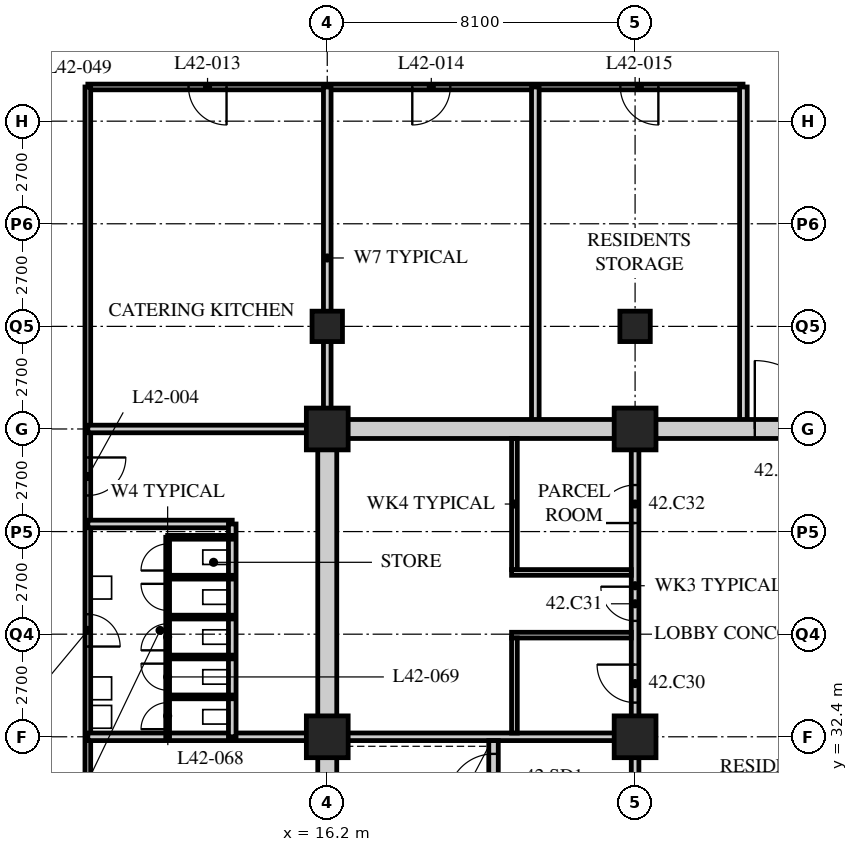
"""IFC4 building model, lengths in metres.
Left out: names, types, materials, properties, quantities, classifications, styles, units other than length and angle.
Written with IfcOpenShell. Run it as: python <this file> out.ifc"""

import sys

from ifc_helpers import new_model, si_unit, direction, frame, frame_2d, origin, origin_2d, place, context, subcontext, project, spatial, rectangle, hollow_rectangle, extrude, element, fill, save


model = new_model("IFC4")
c1 = context("Model", 3, precision=1e-05, world=origin(), true_north=direction((0.0, 1.0)))
c2 = subcontext(c1, "Body", "Model", "MODEL_VIEW")
j1 = project(units=[si_unit("LENGTHUNIT", "METRE"), si_unit("PLANEANGLEUNIT", "RADIAN")], contexts=[c1])
p1 = place(None, origin())
s1 = spatial("IfcSite", under=j1, at=p1, CompositionType="ELEMENT")
p2 = place(p1, origin())
s2 = spatial("IfcBuilding", under=s1, at=p2, CompositionType="ELEMENT")
p3 = place(p2, frame((0.0, 0.0, 165.0)))
s3 = spatial("IfcBuildingStorey", under=s2, at=p3, CompositionType="ELEMENT", Elevation=165.0)
for number, where, z_axis, x_axis in (
    (1, (16.2, 32.4, 0.0), (0.0, 0.0, 1.0), (1.0, 0.0, 0.0)),
    (2, (16.2, 40.5, 0.0), (0.0, 0.0, 1.0), (1.0, 0.0, 0.0)),
):
    element("IfcColumn", number, at=place(p3, frame(where, z_axis=z_axis, x_axis=x_axis)), inside=s3, PredefinedType="COLUMN", context=c2, shape_type="SweptSolid", body=[
        extrude(hollow_rectangle(XDim=1.1, YDim=1.1, WallThickness=0.1, at=origin_2d()), origin(), (0.0, 0.0, 1.0), 5.4),
    ])
p4 = place(p3, frame((16.2, 43.2, 0.0), z_axis=(0.0, 0.0, 1.0), x_axis=(1.0, 0.0, 0.0)))
e3 = element("IfcColumn", 3, at=p4, inside=s3, PredefinedType="COLUMN", context=c2, shape_type="SweptSolid", body=[
    extrude(hollow_rectangle(XDim=0.8, YDim=0.8, WallThickness=0.08, at=origin_2d()), origin(), (0.0, 0.0, 1.0), 5.4),
])
for number, where, z_axis, x_axis in (
    (4, (24.3, 32.4, 0.0), (0.0, 0.0, 1.0), (1.0, 0.0, 0.0)),
    (5, (24.3, 40.5, 0.0), (0.0, 0.0, 1.0), (1.0, 0.0, 0.0)),
):
    element("IfcColumn", number, at=place(p3, frame(where, z_axis=z_axis, x_axis=x_axis)), inside=s3, PredefinedType="COLUMN", context=c2, shape_type="SweptSolid", body=[
        extrude(hollow_rectangle(XDim=1.1, YDim=1.1, WallThickness=0.1, at=origin_2d()), origin(), (0.0, 0.0, 1.0), 5.4),
    ])
p5 = place(p3, frame((24.3, 43.2, 0.0), z_axis=(0.0, 0.0, 1.0), x_axis=(1.0, 0.0, 0.0)))
e6 = element("IfcColumn", 6, at=p5, inside=s3, PredefinedType="COLUMN", context=c2, shape_type="SweptSolid", body=[
    extrude(hollow_rectangle(XDim=0.8, YDim=0.8, WallThickness=0.08, at=origin_2d()), origin(), (0.0, 0.0, 1.0), 5.4),
])
p6 = place(p3, frame((27.14, 49.5, 0.0), z_axis=(0.0, 0.0, 1.0), x_axis=(-1.0, 0.0, 0.0)))
e7 = element("IfcWall", 7, at=p6, inside=s3, PredefinedType="PARTITIONING", context=c2, shape_type="SweptSolid", body=[
    extrude(rectangle(XDim=17.24, YDim=0.15, at=frame_2d((8.62, 0.0))), origin(), (0.0, 0.0, 1.0), 5.19),
])
p7 = place(p6, frame((13.59, 0.0, 0.0)))
e8 = element("IfcOpeningElement", 8, at=p7, cuts=e7, PredefinedType="OPENING", context=c2, shape_type="SweptSolid", body=[
    extrude(rectangle(XDim=1.0, YDim=2.1, at=frame_2d((0.5, 1.05))), frame((0.0, 0.085, 0.0), z_axis=(0.0, -1.0, 0.0), x_axis=(1.0, 0.0, 0.0)), (0.0, 0.0, 1.0), 0.17),
])
p8 = place(p6, frame((7.702, 0.0, 0.0)))
e9 = element("IfcOpeningElement", 9, at=p8, cuts=e7, PredefinedType="OPENING", context=c2, shape_type="SweptSolid", body=[
    extrude(rectangle(XDim=1.0, YDim=2.1, at=frame_2d((0.5, 1.05))), frame((0.0, 0.085, 0.0), z_axis=(0.0, -1.0, 0.0), x_axis=(1.0, 0.0, 0.0)), (0.0, 0.0, 1.0), 0.17),
])
p9 = place(p6, frame((2.228, 0.0, 0.0)))
e10 = element("IfcOpeningElement", 10, at=p9, cuts=e7, PredefinedType="OPENING", context=c2, shape_type="SweptSolid", body=[
    extrude(rectangle(XDim=1.0, YDim=2.1, at=frame_2d((0.5, 1.05))), frame((0.0, 0.085, 0.0), z_axis=(0.0, -1.0, 0.0), x_axis=(1.0, 0.0, 0.0)), (0.0, 0.0, 1.0), 0.17),
])
p10 = place(p3, frame((9.9, 49.5, 0.0), z_axis=(0.0, 0.0, 1.0), x_axis=(0.0, -1.0, 0.0)))
e11 = element("IfcWall", 11, at=p10, inside=s3, PredefinedType="PARTITIONING", context=c2, shape_type="SweptSolid", body=[
    extrude(rectangle(XDim=28.8, YDim=0.15, at=frame_2d((14.4, 0.0))), origin(), (0.0, 0.0, 1.0), 5.19),
])
p11 = place(p10, frame((22.375, 0.0, 0.0)))
e12 = element("IfcOpeningElement", 12, at=p11, cuts=e11, PredefinedType="OPENING", context=c2, shape_type="SweptSolid", body=[
    extrude(rectangle(XDim=0.85, YDim=2.1, at=frame_2d((0.425, 1.05))), frame((0.0, 0.085, 0.0), z_axis=(0.0, -1.0, 0.0), x_axis=(1.0, 0.0, 0.0)), (0.0, 0.0, 1.0), 0.17),
])
p12 = place(p10, frame((18.25, 0.0, 0.0)))
e13 = element("IfcOpeningElement", 13, at=p12, cuts=e11, PredefinedType="OPENING", context=c2, shape_type="SweptSolid", body=[
    extrude(rectangle(XDim=1.0, YDim=2.1, at=frame_2d((0.5, 1.05))), frame((0.0, 0.085, 0.0), z_axis=(0.0, -1.0, 0.0), x_axis=(1.0, 0.0, 0.0)), (0.0, 0.0, 1.0), 0.17),
])
p13 = place(p10, frame((13.875, 0.0, 0.0)))
e14 = element("IfcOpeningElement", 14, at=p13, cuts=e11, PredefinedType="OPENING", context=c2, shape_type="SweptSolid", body=[
    extrude(rectangle(XDim=0.85, YDim=2.1, at=frame_2d((0.425, 1.05))), frame((0.0, 0.085, 0.0), z_axis=(0.0, -1.0, 0.0), x_axis=(1.0, 0.0, 0.0)), (0.0, 0.0, 1.0), 0.17),
])
p14 = place(p10, frame((9.75, 0.0, 0.0)))
e15 = element("IfcOpeningElement", 15, at=p14, cuts=e11, PredefinedType="OPENING", context=c2, shape_type="SweptSolid", body=[
    extrude(rectangle(XDim=1.0, YDim=2.1, at=frame_2d((0.5, 1.05))), frame((0.0, 0.085, 0.0), z_axis=(0.0, -1.0, 0.0), x_axis=(1.0, 0.0, 0.0)), (0.0, 0.0, 1.0), 0.17),
])
p15 = place(p3, frame((9.9, 32.4, 0.0), z_axis=(0.0, 0.0, 1.0), x_axis=(1.0, 0.0, 0.0)))
e16 = element("IfcWall", 16, at=p15, inside=s3, PredefinedType="SOLIDWALL", context=c2, shape_type="SweptSolid", body=[
    extrude(rectangle(XDim=6.3, YDim=0.2, at=frame_2d((3.15, 0.0))), origin(), (0.0, 0.0, 1.0), 5.19),
])
p16 = place(p3, frame((9.9, 38.0, 0.0), z_axis=(0.0, 0.0, 1.0), x_axis=(1.0, 0.0, 0.0)))
e17 = element("IfcWall", 17, at=p16, inside=s3, PredefinedType="SOLIDWALL", context=c2, shape_type="SweptSolid", body=[
    extrude(rectangle(XDim=3.8, YDim=0.2, at=frame_2d((1.9, 0.0))), origin(), (0.0, 0.0, 1.0), 5.19),
])
p17 = place(p3, frame((13.7, 32.4, 0.0), z_axis=(0.0, 0.0, 1.0), x_axis=(0.0, 1.0, 0.0)))
e18 = element("IfcWall", 18, at=p17, inside=s3, PredefinedType="SOLIDWALL", context=c2, shape_type="SweptSolid", body=[
    extrude(rectangle(XDim=5.6, YDim=0.2, at=frame_2d((2.8, 0.0))), origin(), (0.0, 0.0, 1.0), 5.19),
])
p18 = place(p3, frame((16.2, 40.5, 0.0), z_axis=(0.0, 0.0, 1.0), x_axis=(0.0, 1.0, 0.0)))
e19 = element("IfcWall", 19, at=p18, inside=s3, PredefinedType="SOLIDWALL", context=c2, shape_type="SweptSolid", body=[
    extrude(rectangle(XDim=9.0, YDim=0.2, at=frame_2d((4.5, 0.0))), origin(), (0.0, 0.0, 1.0), 4.42),
])
for number, where, z_axis, x_axis in (
    (20, (21.675, 49.5, 0.0), (0.0, 0.0, 1.0), (0.0, -1.0, 0.0)),
    (21, (27.15, 40.5, 0.0), (0.0, 0.0, 1.0), (0.0, 1.0, 0.0)),
):
    element("IfcWall", number, at=place(p3, frame(where, z_axis=z_axis, x_axis=x_axis)), inside=s3, PredefinedType="SOLIDWALL", context=c2, shape_type="SweptSolid", body=[
        extrude(rectangle(XDim=9.0, YDim=0.2, at=frame_2d((4.5, 0.0))), origin(), (0.0, 0.0, 1.0), 5.19),
    ])
p19 = place(p3, frame((9.9, 40.5, 0.0), z_axis=(0.0, 0.0, 1.0), x_axis=(1.0, 0.0, 0.0)))
e22 = element("IfcWall", 22, at=p19, inside=s3, PredefinedType="SOLIDWALL", context=c2, shape_type="SweptSolid", body=[
    extrude(rectangle(XDim=6.3, YDim=0.2, at=frame_2d((3.15, 0.0))), origin(), (0.0, 0.0, 1.0), 5.19),
])
p20 = place(p3, frame((12.0, 32.4, 0.0), z_axis=(0.0, 0.0, 1.0), x_axis=(0.0, 1.0, 0.0)))
e23 = element("IfcWall", 23, at=p20, inside=s3, PredefinedType="PARTITIONING", context=c2, shape_type="SweptSolid", body=[
    extrude(rectangle(XDim=5.25, YDim=0.1, at=frame_2d((2.625, 0.0))), origin(), (0.0, 0.0, 1.0), 5.19),
])
p21 = place(p20, frame((0.2, 0.0, 0.0)))
e24 = element("IfcOpeningElement", 24, at=p21, cuts=e23, PredefinedType="OPENING", context=c2, shape_type="SweptSolid", body=[
    extrude(rectangle(XDim=0.7, YDim=2.0, at=frame_2d((0.35, 1.0))), frame((0.0, 0.06, 0.0), z_axis=(0.0, -1.0, 0.0), x_axis=(1.0, 0.0, 0.0)), (0.0, 0.0, 1.0), 0.12),
])
p22 = place(p20, frame((1.225, 0.0, 0.0)))
e25 = element("IfcOpeningElement", 25, at=p22, cuts=e23, PredefinedType="OPENING", context=c2, shape_type="SweptSolid", body=[
    extrude(rectangle(XDim=0.7, YDim=2.0, at=frame_2d((0.35, 1.0))), frame((0.0, 0.06, 0.0), z_axis=(0.0, -1.0, 0.0), x_axis=(1.0, 0.0, 0.0)), (0.0, 0.0, 1.0), 0.12),
])
p23 = place(p20, frame((2.275, 0.0, 0.0)))
e26 = element("IfcOpeningElement", 26, at=p23, cuts=e23, PredefinedType="OPENING", context=c2, shape_type="SweptSolid", body=[
    extrude(rectangle(XDim=0.7, YDim=2.0, at=frame_2d((0.35, 1.0))), frame((0.0, 0.06, 0.0), z_axis=(0.0, -1.0, 0.0), x_axis=(1.0, 0.0, 0.0)), (0.0, 0.0, 1.0), 0.12),
])
p24 = place(p20, frame((3.325, 0.0, 0.0)))
e27 = element("IfcOpeningElement", 27, at=p24, cuts=e23, PredefinedType="OPENING", context=c2, shape_type="SweptSolid", body=[
    extrude(rectangle(XDim=0.7, YDim=2.0, at=frame_2d((0.35, 1.0))), frame((0.0, 0.06, 0.0), z_axis=(0.0, -1.0, 0.0), x_axis=(1.0, 0.0, 0.0)), (0.0, 0.0, 1.0), 0.12),
])
p25 = place(p20, frame((4.375, 0.0, 0.0)))
e28 = element("IfcOpeningElement", 28, at=p25, cuts=e23, PredefinedType="OPENING", context=c2, shape_type="SweptSolid", body=[
    extrude(rectangle(XDim=0.7, YDim=2.0, at=frame_2d((0.35, 1.0))), frame((0.0, 0.06, 0.0), z_axis=(0.0, -1.0, 0.0), x_axis=(1.0, 0.0, 0.0)), (0.0, 0.0, 1.0), 0.12),
])
for number, where, z_axis, x_axis in (
    (29, (12.0, 33.45, 0.0), (0.0, 0.0, 1.0), (1.0, 0.0, 0.0)),
    (30, (12.0, 34.5, 0.0), (0.0, 0.0, 1.0), (1.0, 0.0, 0.0)),
    (31, (12.0, 35.55, 0.0), (0.0, 0.0, 1.0), (1.0, 0.0, 0.0)),
    (32, (12.0, 36.6, 0.0), (0.0, 0.0, 1.0), (1.0, 0.0, 0.0)),
    (33, (12.0, 37.65, 0.0), (0.0, 0.0, 1.0), (1.0, 0.0, 0.0)),
):
    element("IfcWall", number, at=place(p3, frame(where, z_axis=z_axis, x_axis=x_axis)), inside=s3, PredefinedType="PARTITIONING", context=c2, shape_type="SweptSolid", body=[
        extrude(rectangle(XDim=1.7, YDim=0.1, at=frame_2d((0.85, 0.0))), origin(), (0.0, 0.0, 1.0), 5.19),
    ])
p26 = place(p3, frame((15.95, 40.5, 0.0), z_axis=(0.0, 0.0, 1.0), x_axis=(1.0, 0.0, 0.0)))
e34 = element("IfcWall", 34, at=p26, inside=s3, PredefinedType="SOLIDWALL", context=c2, shape_type="SweptSolid", body=[
    extrude(rectangle(XDim=24.8, YDim=0.5, at=frame_2d((12.4, 0.0))), origin(), (0.0, 0.0, 1.0), 4.42),
])
p27 = place(p26, frame((11.5, 0.0, 0.0)))
e35 = element("IfcOpeningElement", 35, at=p27, cuts=e34, PredefinedType="OPENING", context=c2, shape_type="SweptSolid", body=[
    extrude(rectangle(XDim=1.8, YDim=2.4, at=frame_2d((0.9, 1.2))), frame((0.0, 0.26, 0.0), z_axis=(0.0, -1.0, 0.0), x_axis=(1.0, 0.0, 0.0)), (0.0, 0.0, 1.0), 0.52),
])
p28 = place(p3, frame((16.2, 24.55, 0.0), z_axis=(0.0, 0.0, 1.0), x_axis=(0.0, 1.0, 0.0)))
e36 = element("IfcWall", 36, at=p28, inside=s3, PredefinedType="SOLIDWALL", context=c2, shape_type="SweptSolid", body=[
    extrude(rectangle(XDim=15.7, YDim=0.5, at=frame_2d((7.85, 0.0))), origin(), (0.0, 0.0, 1.0), 4.42),
])
p29 = place(p3, frame((16.45, 32.4, 0.0), z_axis=(0.0, 0.0, 1.0), x_axis=(1.0, 0.0, 0.0)))
e37 = element("IfcWall", 37, at=p29, inside=s3, PredefinedType="SOLIDWALL", context=c2, shape_type="SweptSolid", body=[
    extrude(rectangle(XDim=7.95, YDim=0.2, at=frame_2d((3.975, 0.0))), origin(), (0.0, 0.0, 1.0), 4.578),
])
p30 = place(p3, frame((24.3, 24.55, 0.0), z_axis=(0.0, 0.0, 1.0), x_axis=(0.0, 1.0, 0.0)))
e38 = element("IfcWall", 38, at=p30, inside=s3, PredefinedType="SOLIDWALL", context=c2, shape_type="SweptSolid", body=[
    extrude(rectangle(XDim=7.75, YDim=0.2, at=frame_2d((3.875, 0.0))), origin(), (0.0, 0.0, 1.0), 4.578),
])
p31 = place(p30, frame((4.6, 0.0, 0.0)))
e39 = element("IfcOpeningElement", 39, at=p31, cuts=e38, PredefinedType="OPENING", context=c2, shape_type="SweptSolid", body=[
    extrude(rectangle(XDim=1.2, YDim=2.1, at=frame_2d((0.6, 1.05))), frame((0.0, 0.11, 0.0), z_axis=(0.0, -1.0, 0.0), x_axis=(1.0, 0.0, 0.0)), (0.0, 0.0, 1.0), 0.22),
])
p32 = place(p3, frame((20.575, 24.55, 0.0), z_axis=(0.0, 0.0, 1.0), x_axis=(0.0, 1.0, 0.0)))
e40 = element("IfcWall", 40, at=p32, inside=s3, PredefinedType="SOLIDWALL", context=c2, shape_type="SweptSolid", body=[
    extrude(rectangle(XDim=7.75, YDim=0.25, at=frame_2d((3.875, 0.0))), origin(), (0.0, 0.0, 1.0), 5.19),
])
p33 = place(p32, frame((6.2, 0.0, 0.0)))
e41 = element("IfcOpeningElement", 41, at=p33, cuts=e40, PredefinedType="OPENING", context=c2, shape_type="SweptSolid", body=[
    extrude(rectangle(XDim=1.2, YDim=2.1, at=frame_2d((0.6, 1.05))), frame((0.0, 0.135, 0.0), z_axis=(0.0, -1.0, 0.0), x_axis=(1.0, 0.0, 0.0)), (0.0, 0.0, 1.0), 0.27),
])
p34 = place(p3, frame((24.3, 32.5, 0.0), z_axis=(0.0, 0.0, 1.0), x_axis=(0.0, 1.0, 0.0)))
e42 = element("IfcWall", 42, at=p34, inside=s3, PredefinedType="PARTITIONING", context=c2, shape_type="SweptSolid", body=[
    extrude(rectangle(XDim=7.75, YDim=0.2, at=frame_2d((3.875, 0.0))), origin(), (0.0, 0.0, 1.0), 4.578),
])
p35 = place(p34, frame((0.8, 0.0, 0.0)))
e43 = element("IfcOpeningElement", 43, at=p35, cuts=e42, PredefinedType="OPENING", context=c2, shape_type="SweptSolid", body=[
    extrude(rectangle(XDim=1.0, YDim=2.1, at=frame_2d((0.5, 1.05))), frame((0.0, 0.11, 0.0), z_axis=(0.0, -1.0, 0.0), x_axis=(1.0, 0.0, 0.0)), (0.0, 0.0, 1.0), 0.22),
])
p36 = place(p34, frame((2.95, 0.0, 0.0)))
e44 = element("IfcOpeningElement", 44, at=p36, cuts=e42, PredefinedType="OPENING", context=c2, shape_type="SweptSolid", body=[
    extrude(rectangle(XDim=0.9, YDim=2.1, at=frame_2d((0.45, 1.05))), frame((0.0, 0.11, 0.0), z_axis=(0.0, -1.0, 0.0), x_axis=(1.0, 0.0, 0.0)), (0.0, 0.0, 1.0), 0.22),
])
p37 = place(p34, frame((5.525, 0.0, 0.0)))
e45 = element("IfcOpeningElement", 45, at=p37, cuts=e42, PredefinedType="OPENING", context=c2, shape_type="SweptSolid", body=[
    extrude(rectangle(XDim=1.0, YDim=2.1, at=frame_2d((0.5, 1.05))), frame((0.0, 0.11, 0.0), z_axis=(0.0, -1.0, 0.0), x_axis=(1.0, 0.0, 0.0)), (0.0, 0.0, 1.0), 0.22),
])
for number, where, z_axis, x_axis in (
    (46, (21.05, 35.075, 0.0), (0.0, 0.0, 1.0), (1.0, 0.0, 0.0)),
    (47, (21.05, 36.725, 0.0), (0.0, 0.0, 1.0), (1.0, 0.0, 0.0)),
):
    element("IfcWall", number, at=place(p3, frame(where, z_axis=z_axis, x_axis=x_axis)), inside=s3, PredefinedType="PARTITIONING", context=c2, shape_type="SweptSolid", body=[
        extrude(rectangle(XDim=3.15, YDim=0.15, at=frame_2d((1.575, 0.0))), origin(), (0.0, 0.0, 1.0), 5.19),
    ])
p38 = place(p3, frame((21.125, 32.5, 0.0), z_axis=(0.0, 0.0, 1.0), x_axis=(0.0, 1.0, 0.0)))
e48 = element("IfcWall", 48, at=p38, inside=s3, PredefinedType="PARTITIONING", context=c2, shape_type="SweptSolid", body=[
    extrude(rectangle(XDim=2.5, YDim=0.15, at=frame_2d((1.25, 0.0))), origin(), (0.0, 0.0, 1.0), 5.19),
])
p39 = place(p3, frame((21.125, 36.8, 0.0), z_axis=(0.0, 0.0, 1.0), x_axis=(0.0, 1.0, 0.0)))
e49 = element("IfcWall", 49, at=p39, inside=s3, PredefinedType="PARTITIONING", context=c2, shape_type="SweptSolid", body=[
    extrude(rectangle(XDim=3.45, YDim=0.15, at=frame_2d((1.725, 0.0))), origin(), (0.0, 0.0, 1.0), 5.19),
])
p40 = place(p13, origin())
e50 = element("IfcDoor", 50, at=p40, inside=s3, OperationType="SINGLE_SWING_RIGHT", PredefinedType="DOOR", context=c2, shape_type="SweptSolid", body=[
    extrude(rectangle(XDim=0.85, YDim=2.1, at=frame_2d((0.425, 1.05))), frame((0.0, 0.025, 0.0), z_axis=(0.0, -1.0, 0.0), x_axis=(1.0, 0.0, 0.0)), (0.0, 0.0, 1.0), 0.05),
])
fill(e14, e50)
p41 = place(p14, origin())
e51 = element("IfcDoor", 51, at=p41, inside=s3, OperationType="SINGLE_SWING_LEFT", PredefinedType="DOOR", context=c2, shape_type="SweptSolid", body=[
    extrude(rectangle(XDim=1.0, YDim=2.1, at=frame_2d((0.5, 1.05))), frame((0.0, 0.025, 0.0), z_axis=(0.0, -1.0, 0.0), x_axis=(1.0, 0.0, 0.0)), (0.0, 0.0, 1.0), 0.05),
])
fill(e15, e51)
p42 = place(p7, origin())
e52 = element("IfcDoor", 52, at=p42, inside=s3, OperationType="SINGLE_SWING_LEFT", PredefinedType="DOOR", context=c2, shape_type="SweptSolid", body=[
    extrude(rectangle(XDim=1.0, YDim=2.1, at=frame_2d((0.5, 1.05))), frame((0.0, 0.025, 0.0), z_axis=(0.0, -1.0, 0.0), x_axis=(1.0, 0.0, 0.0)), (0.0, 0.0, 1.0), 0.05),
])
fill(e8, e52)
p43 = place(p8, origin())
e53 = element("IfcDoor", 53, at=p43, inside=s3, OperationType="SINGLE_SWING_RIGHT", PredefinedType="DOOR", context=c2, shape_type="SweptSolid", body=[
    extrude(rectangle(XDim=1.0, YDim=2.1, at=frame_2d((0.5, 1.05))), frame((0.0, 0.025, 0.0), z_axis=(0.0, -1.0, 0.0), x_axis=(1.0, 0.0, 0.0)), (0.0, 0.0, 1.0), 0.05),
])
fill(e9, e53)
p44 = place(p9, origin())
e54 = element("IfcDoor", 54, at=p44, inside=s3, OperationType="SINGLE_SWING_LEFT", PredefinedType="DOOR", context=c2, shape_type="SweptSolid", body=[
    extrude(rectangle(XDim=1.0, YDim=2.1, at=frame_2d((0.5, 1.05))), frame((0.0, 0.025, 0.0), z_axis=(0.0, -1.0, 0.0), x_axis=(1.0, 0.0, 0.0)), (0.0, 0.0, 1.0), 0.05),
])
fill(e10, e54)
p45 = place(p21, origin())
e55 = element("IfcDoor", 55, at=p45, inside=s3, OperationType="SINGLE_SWING_LEFT", PredefinedType="DOOR", context=c2, shape_type="SweptSolid", body=[
    extrude(rectangle(XDim=0.7, YDim=2.0, at=frame_2d((0.35, 1.0))), frame((0.0, 0.025, 0.0), z_axis=(0.0, -1.0, 0.0), x_axis=(1.0, 0.0, 0.0)), (0.0, 0.0, 1.0), 0.05),
])
fill(e24, e55)
p46 = place(p22, origin())
e56 = element("IfcDoor", 56, at=p46, inside=s3, OperationType="SINGLE_SWING_RIGHT", PredefinedType="DOOR", context=c2, shape_type="SweptSolid", body=[
    extrude(rectangle(XDim=0.7, YDim=2.0, at=frame_2d((0.35, 1.0))), frame((0.0, 0.025, 0.0), z_axis=(0.0, -1.0, 0.0), x_axis=(1.0, 0.0, 0.0)), (0.0, 0.0, 1.0), 0.05),
])
fill(e25, e56)
p47 = place(p23, origin())
e57 = element("IfcDoor", 57, at=p47, inside=s3, OperationType="SINGLE_SWING_LEFT", PredefinedType="DOOR", context=c2, shape_type="SweptSolid", body=[
    extrude(rectangle(XDim=0.7, YDim=2.0, at=frame_2d((0.35, 1.0))), frame((0.0, 0.025, 0.0), z_axis=(0.0, -1.0, 0.0), x_axis=(1.0, 0.0, 0.0)), (0.0, 0.0, 1.0), 0.05),
])
fill(e26, e57)
p48 = place(p24, origin())
e58 = element("IfcDoor", 58, at=p48, inside=s3, OperationType="SINGLE_SWING_RIGHT", PredefinedType="DOOR", context=c2, shape_type="SweptSolid", body=[
    extrude(rectangle(XDim=0.7, YDim=2.0, at=frame_2d((0.35, 1.0))), frame((0.0, 0.025, 0.0), z_axis=(0.0, -1.0, 0.0), x_axis=(1.0, 0.0, 0.0)), (0.0, 0.0, 1.0), 0.05),
])
fill(e27, e58)
p49 = place(p25, origin())
e59 = element("IfcDoor", 59, at=p49, inside=s3, OperationType="SINGLE_SWING_LEFT", PredefinedType="DOOR", context=c2, shape_type="SweptSolid", body=[
    extrude(rectangle(XDim=0.7, YDim=2.0, at=frame_2d((0.35, 1.0))), frame((0.0, 0.025, 0.0), z_axis=(0.0, -1.0, 0.0), x_axis=(1.0, 0.0, 0.0)), (0.0, 0.0, 1.0), 0.05),
])
fill(e28, e59)
p50 = place(p35, origin())
e60 = element("IfcDoor", 60, at=p50, inside=s3, OperationType="SINGLE_SWING_RIGHT", PredefinedType="DOOR", context=c2, shape_type="SweptSolid", body=[
    extrude(rectangle(XDim=1.0, YDim=2.1, at=frame_2d((0.5, 1.05))), frame((0.0, 0.025, 0.0), z_axis=(0.0, -1.0, 0.0), x_axis=(1.0, 0.0, 0.0)), (0.0, 0.0, 1.0), 0.05),
])
fill(e43, e60)
p51 = place(p36, origin())
e61 = element("IfcDoor", 61, at=p51, inside=s3, OperationType="SINGLE_SWING_RIGHT", PredefinedType="DOOR", context=c2, shape_type="SweptSolid", body=[
    extrude(rectangle(XDim=0.9, YDim=2.1, at=frame_2d((0.45, 1.05))), frame((0.0, 0.025, 0.0), z_axis=(0.0, -1.0, 0.0), x_axis=(1.0, 0.0, 0.0)), (0.0, 0.0, 1.0), 0.05),
])
fill(e44, e61)
p52 = place(p37, origin())
e62 = element("IfcDoor", 62, at=p52, inside=s3, OperationType="SINGLE_SWING_LEFT", PredefinedType="DOOR", context=c2, shape_type="SweptSolid", body=[
    extrude(rectangle(XDim=1.0, YDim=2.1, at=frame_2d((0.5, 1.05))), frame((0.0, 0.025, 0.0), z_axis=(0.0, -1.0, 0.0), x_axis=(1.0, 0.0, 0.0)), (0.0, 0.0, 1.0), 0.05),
])
fill(e45, e62)
p53 = place(p33, origin())
e63 = element("IfcDoor", 63, at=p53, inside=s3, OperationType="SINGLE_SWING_LEFT", PredefinedType="DOOR", context=c2, shape_type="SweptSolid", body=[
    extrude(rectangle(XDim=1.2, YDim=2.1, at=frame_2d((0.6, 1.05))), frame((0.0, 0.025, 0.0), z_axis=(0.0, -1.0, 0.0), x_axis=(1.0, 0.0, 0.0)), (0.0, 0.0, 1.0), 0.05),
])
fill(e41, e63)
p54 = place(p27, origin())
e64 = element("IfcDoor", 64, at=p54, inside=s3, OperationType="DOUBLE_DOOR_SINGLE_SWING", PredefinedType="DOOR", context=c2, shape_type="SweptSolid", body=[
    extrude(rectangle(XDim=1.8, YDim=2.4, at=frame_2d((0.9, 1.2))), frame((0.0, 0.025, 0.0), z_axis=(0.0, -1.0, 0.0), x_axis=(1.0, 0.0, 0.0)), (0.0, 0.0, 1.0), 0.05),
])
fill(e35, e64)
save(model, sys.argv[1])
